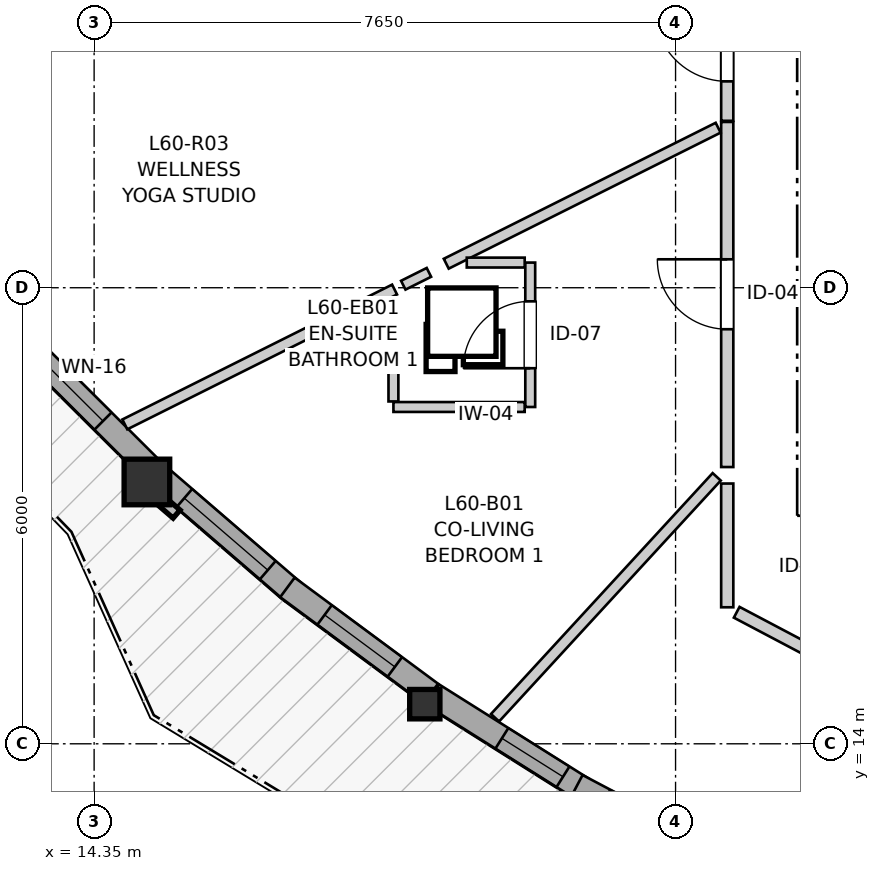
"""IFC4 building model, lengths in metres.
Left out: names, types, materials, properties, quantities, classifications, styles, units other than length and angle.
Written with IfcOpenShell. Run it as: python <this file> out.ifc"""

import sys

from ifc_helpers import new_model, si_unit, direction, frame, frame_2d, origin, origin_2d, place, context, subcontext, project, spatial, rectangle, i_section, extrude, source, transform, mapped, element, fill, save


model = new_model("IFC4")
c1 = context("Model", 3, precision=1e-05, world=origin(), true_north=direction((0.0, 1.0)))
c2 = subcontext(c1, "Body", "Model", "MODEL_VIEW")
j1 = project(units=[si_unit("LENGTHUNIT", "METRE"), si_unit("PLANEANGLEUNIT", "RADIAN")], contexts=[c1])
p1 = place(None, origin())
s1 = spatial("IfcSite", under=j1, at=p1, CompositionType="ELEMENT")
p2 = place(p1, origin())
s2 = spatial("IfcBuilding", under=s1, at=p2, CompositionType="ELEMENT")
p3 = place(p2, frame((0.0, 0.0, 202.0)))
s3 = spatial("IfcBuildingStorey", under=s2, at=p3, CompositionType="ELEMENT", Elevation=202.0)
m1 = source(origin(), c2, "Body", "SweptSolid", [
    extrude(rectangle(XDim=0.6, YDim=0.6, at=origin_2d()), origin(), (0.0, 0.0, 1.0), 2.935),
])
p4 = place(p3, frame((15.044, 17.445, 0.0), z_axis=(0.0, 0.0, 1.0), x_axis=(1.0, 0.0, 0.0)))
e1 = element("IfcColumn", 1, at=p4, inside=s3, PredefinedType="COLUMN", context=c2, shape_type="MappedRepresentation", body=[
    mapped(m1, transform((0.0, 0.0, 0.0), x_axis=(1.0, 0.0, 0.0), y_axis=(0.0, 1.0, 0.0), z_axis=(0.0, 0.0, 1.0), scale=1.0)),
])
m2 = source(origin(), c2, "Body", "SweptSolid", [
    extrude(i_section(OverallWidth=0.398, OverallDepth=0.387, WebThickness=0.019, FlangeThickness=0.03, FilletRadius=0.015, at=origin_2d()), origin(), (0.0, 0.0, 1.0), 2.935),
])
p5 = place(p3, frame((18.701, 14.521, 0.0), z_axis=(0.0, 0.0, 1.0), x_axis=(1.0, 0.0, 0.0)))
e2 = element("IfcColumn", 2, at=p5, inside=s3, PredefinedType="PILASTER", context=c2, shape_type="MappedRepresentation", body=[
    mapped(m2, transform((0.0, 0.0, 0.0), x_axis=(1.0, 0.0, 0.0), y_axis=(0.0, 1.0, 0.0), z_axis=(0.0, 0.0, 1.0), scale=1.0)),
])
p6 = place(p3, frame((13.434, 19.275, 0.0), z_axis=(0.0, 0.0, 1.0), x_axis=(0.708408377073, -0.705802784985, 0.0)))
e3 = element("IfcWall", 3, at=p6, inside=s3, PredefinedType="SOLIDWALL", context=c2, shape_type="SweptSolid", body=[
    extrude(rectangle(XDim=2.343, YDim=0.32, at=frame_2d((1.171, 0.0))), origin(), (0.0, 0.0, 1.0), 2.555),
])
p7 = place(p6, frame((0.308, 0.0, 0.82)))
e4 = element("IfcOpeningElement", 4, at=p7, cuts=e3, PredefinedType="OPENING", context=c2, shape_type="SweptSolid", body=[
    extrude(rectangle(XDim=1.15, YDim=1.2, at=frame_2d((0.575, 0.6))), frame((0.0, 0.17, 0.0), z_axis=(0.0, -1.0, 0.0), x_axis=(1.0, 0.0, 0.0)), (0.0, 0.0, 1.0), 0.34),
])
p8 = place(p3, frame((15.217, 17.507, 0.0), z_axis=(0.0, 0.0, 1.0), x_axis=(0.757473216355, -0.652866239366, 0.0)))
e5 = element("IfcWall", 5, at=p8, inside=s3, PredefinedType="SOLIDWALL", context=c2, shape_type="SweptSolid", body=[
    extrude(rectangle(XDim=2.303, YDim=0.32, at=frame_2d((1.152, 0.0))), origin(), (0.0, 0.0, 1.0), 2.555),
])
p9 = place(p8, frame((0.422, 0.0, 0.82)))
e6 = element("IfcOpeningElement", 6, at=p9, cuts=e5, PredefinedType="OPENING", context=c2, shape_type="SweptSolid", body=[
    extrude(rectangle(XDim=1.45, YDim=1.25, at=frame_2d((0.725, 0.625))), frame((0.0, 0.17, 0.0), z_axis=(0.0, -1.0, 0.0), x_axis=(1.0, 0.0, 0.0)), (0.0, 0.0, 1.0), 0.34),
])
p10 = place(p3, frame((16.893, 16.058, 0.0), z_axis=(0.0, 0.0, 1.0), x_axis=(0.803791161534, -0.594911563713, 0.0)))
e7 = element("IfcWall", 7, at=p10, inside=s3, PredefinedType="SOLIDWALL", context=c2, shape_type="SweptSolid", body=[
    extrude(rectangle(XDim=2.347, YDim=0.32, at=frame_2d((1.173, 0.0))), origin(), (0.0, 0.0, 1.0), 2.555),
])
p11 = place(p10, frame((0.608, 0.0, 0.82)))
e8 = element("IfcOpeningElement", 8, at=p11, cuts=e7, PredefinedType="OPENING", context=c2, shape_type="SweptSolid", body=[
    extrude(rectangle(XDim=1.15, YDim=1.2, at=frame_2d((0.575, 0.6))), frame((0.0, 0.17, 0.0), z_axis=(0.0, -1.0, 0.0), x_axis=(1.0, 0.0, 0.0)), (0.0, 0.0, 1.0), 0.34),
])
p12 = place(p3, frame((18.803, 14.646, 0.0), z_axis=(0.0, 0.0, 1.0), x_axis=(0.846390024768, -0.532563541724, 0.0)))
e9 = element("IfcWall", 9, at=p12, inside=s3, PredefinedType="SOLIDWALL", context=c2, shape_type="SweptSolid", body=[
    extrude(rectangle(XDim=2.334, YDim=0.32, at=frame_2d((1.167, 0.0))), origin(), (0.0, 0.0, 1.0), 2.555),
])
p13 = place(p12, frame((1.078, 0.0, 0.82)))
e10 = element("IfcOpeningElement", 10, at=p13, cuts=e9, PredefinedType="OPENING", context=c2, shape_type="SweptSolid", body=[
    extrude(rectangle(XDim=0.95, YDim=1.35, at=frame_2d((0.475, 0.675))), frame((0.0, 0.17, 0.0), z_axis=(0.0, -1.0, 0.0), x_axis=(1.0, 0.0, 0.0)), (0.0, 0.0, 1.0), 0.34),
])
p14 = place(p3, frame((20.702, 13.448, 0.0), z_axis=(0.0, 0.0, 1.0), x_axis=(0.884374859293, -0.466777364758, 0.0)))
e11 = element("IfcWall", 11, at=p14, inside=s3, PredefinedType="SOLIDWALL", context=c2, shape_type="SweptSolid", body=[
    extrude(rectangle(XDim=2.264, YDim=0.32, at=frame_2d((1.132, 0.0))), origin(), (0.0, 0.0, 1.0), 2.555),
])
p15 = place(p14, frame((0.412, 0.0, 0.82)))
e12 = element("IfcOpeningElement", 12, at=p15, cuts=e11, PredefinedType="OPENING", context=c2, shape_type="SweptSolid", body=[
    extrude(rectangle(XDim=1.45, YDim=1.25, at=frame_2d((0.725, 0.625))), frame((0.0, 0.17, 0.0), z_axis=(0.0, -1.0, 0.0), x_axis=(1.0, 0.0, 0.0)), (0.0, 0.0, 1.0), 0.34),
])
p16 = place(p3, frame((22.68, 17.641, 0.0), z_axis=(0.0, 0.0, 1.0), x_axis=(0.0, 1.0, 0.0)))
e13 = element("IfcWall", 13, at=p16, inside=s3, PredefinedType="PARTITIONING", context=c2, shape_type="SweptSolid", body=[
    extrude(rectangle(XDim=4.54, YDim=0.16, at=frame_2d((2.27, 0.0))), origin(), (0.0, 0.0, 1.0), 2.935),
])
p17 = place(p16, frame((1.813, 0.0, 0.0)))
e14 = element("IfcOpeningElement", 14, at=p17, cuts=e13, PredefinedType="OPENING", context=c2, shape_type="SweptSolid", body=[
    extrude(rectangle(XDim=0.92, YDim=2.1, at=frame_2d((0.46, 1.05))), frame((0.0, 0.09, 0.0), z_axis=(0.0, -1.0, 0.0), x_axis=(1.0, 0.0, 0.0)), (0.0, 0.0, 1.0), 0.18),
])
p18 = place(p3, frame((22.68, 22.196, 0.0), z_axis=(0.0, 0.0, 1.0), x_axis=(0.0, 1.0, 0.0)))
e15 = element("IfcWall", 15, at=p18, inside=s3, PredefinedType="PARTITIONING", context=c2, shape_type="SweptSolid", body=[
    extrude(rectangle(XDim=1.954, YDim=0.16, at=frame_2d((0.977, 0.0))), origin(), (0.0, 0.0, 1.0), 2.935),
])
p19 = place(p18, frame((0.519, 0.0, 0.0)))
e16 = element("IfcOpeningElement", 16, at=p19, cuts=e15, PredefinedType="OPENING", context=c2, shape_type="SweptSolid", body=[
    extrude(rectangle(XDim=0.96, YDim=2.1, at=frame_2d((0.48, 1.05))), frame((0.0, 0.09, 0.0), z_axis=(0.0, -1.0, 0.0), x_axis=(1.0, 0.0, 0.0)), (0.0, 0.0, 1.0), 0.18),
])
p20 = place(p3, frame((20.088, 18.431, 0.0), z_axis=(0.0, 0.0, 1.0), x_axis=(0.0, 1.0, 0.0)))
e17 = element("IfcWall", 17, at=p20, inside=s3, PredefinedType="PARTITIONING", context=c2, shape_type="SweptSolid", body=[
    extrude(rectangle(XDim=1.9, YDim=0.13, at=frame_2d((0.95, 0.0))), origin(), (0.0, 0.0, 1.0), 2.935),
])
p21 = place(p20, frame((0.51, 0.0, 0.0)))
e18 = element("IfcOpeningElement", 18, at=p21, cuts=e17, PredefinedType="OPENING", context=c2, shape_type="SweptSolid", body=[
    extrude(rectangle(XDim=0.88, YDim=2.05, at=frame_2d((0.44, 1.025))), frame((0.0, 0.075, 0.0), z_axis=(0.0, -1.0, 0.0), x_axis=(1.0, 0.0, 0.0)), (0.0, 0.0, 1.0), 0.15),
])
p22 = place(p3, frame((19.625, 14.343, 0.0), z_axis=(0.0, 0.0, 1.0), x_axis=(0.677104421975, 0.735886949023, 0.0)))
e19 = element("IfcWall", 19, at=p22, inside=s3, PredefinedType="PARTITIONING", context=c2, shape_type="SweptSolid", body=[
    extrude(rectangle(XDim=4.307, YDim=0.145, at=frame_2d((2.153, 0.0))), origin(), (0.0, 0.0, 1.0), 2.935),
])
p23 = place(p3, frame((18.983, 20.316, 0.0), z_axis=(0.0, 0.0, 1.0), x_axis=(0.894366146285, 0.447335664104, 0.0)))
e20 = element("IfcWall", 20, at=p23, inside=s3, PredefinedType="PARTITIONING", context=c2, shape_type="SweptSolid", body=[
    extrude(rectangle(XDim=4.0, YDim=0.145, at=frame_2d((2.0, 0.0))), origin(), (0.0, 0.0, 1.0), 2.935),
])
p24 = place(p3, frame((14.754, 18.202, 0.0), z_axis=(0.0, 0.0, 1.0), x_axis=(0.894464106055, 0.44713975777, 0.0)))
e21 = element("IfcWall", 21, at=p24, inside=s3, PredefinedType="PARTITIONING", context=c2, shape_type="SweptSolid", body=[
    extrude(rectangle(XDim=3.968, YDim=0.145, at=frame_2d((1.984, 0.0))), origin(), (0.0, 0.0, 1.0), 2.935),
])
p25 = place(p3, frame((22.68, 15.796, 0.0), z_axis=(0.0, 0.0, 1.0), x_axis=(0.0, 1.0, 0.0)))
e22 = element("IfcWall", 22, at=p25, inside=s3, PredefinedType="PARTITIONING", context=c2, shape_type="SweptSolid", body=[
    extrude(rectangle(XDim=1.628, YDim=0.16, at=frame_2d((0.814, 0.0))), origin(), (0.0, 0.0, 1.0), 2.935),
])
p26 = place(p3, frame((18.288, 18.431, 0.0), z_axis=(0.0, 0.0, 1.0), x_axis=(1.0, 0.0, 0.0)))
e23 = element("IfcWall", 23, at=p26, inside=s3, PredefinedType="PARTITIONING", context=c2, shape_type="SweptSolid", body=[
    extrude(rectangle(XDim=1.727, YDim=0.13, at=frame_2d((0.863, 0.0))), origin(), (0.0, 0.0, 1.0), 2.935),
])
p27 = place(p3, frame((22.804, 15.73, 0.0), z_axis=(0.0, 0.0, 1.0), x_axis=(0.884376976103, -0.466773354143, 0.0)))
e24 = element("IfcWall", 24, at=p27, inside=s3, PredefinedType="PARTITIONING", context=c2, shape_type="SweptSolid", body=[
    extrude(rectangle(XDim=1.44, YDim=0.16, at=frame_2d((0.72, 0.0))), origin(), (0.0, 0.0, 1.0), 2.935),
])
p28 = place(p3, frame((18.288, 18.504, 0.0), z_axis=(0.0, 0.0, 1.0), x_axis=(0.0, 1.0, 0.0)))
e25 = element("IfcWall", 25, at=p28, inside=s3, PredefinedType="PARTITIONING", context=c2, shape_type="SweptSolid", body=[
    extrude(rectangle(XDim=1.344, YDim=0.13, at=frame_2d((0.672, 0.0))), origin(), (0.0, 0.0, 1.0), 2.935),
])
p29 = place(p3, frame((19.253, 20.331, 0.0), z_axis=(0.0, 0.0, 1.0), x_axis=(1.0, 0.0, 0.0)))
e26 = element("IfcWall", 26, at=p29, inside=s3, PredefinedType="PARTITIONING", context=c2, shape_type="SweptSolid", body=[
    extrude(rectangle(XDim=0.762, YDim=0.13, at=frame_2d((0.381, 0.0))), origin(), (0.0, 0.0, 1.0), 2.935),
])
p30 = place(p3, frame((18.417, 20.033, 0.0), z_axis=(0.0, 0.0, 1.0), x_axis=(0.894427191, 0.4472135955, 0.0)))
e27 = element("IfcWall", 27, at=p30, inside=s3, PredefinedType="PARTITIONING", context=c2, shape_type="SweptSolid", body=[
    extrude(rectangle(XDim=0.377, YDim=0.13, at=frame_2d((0.188, 0.0))), origin(), (0.0, 0.0, 1.0), 2.935),
])
m3 = source(origin(), c2, "Body", "SweptSolid", [
    extrude(rectangle(XDim=1.15, YDim=1.2, at=frame_2d((0.575, 0.6))), frame((0.0, 0.03, 0.0), z_axis=(0.0, -1.0, 0.0), x_axis=(1.0, 0.0, 0.0)), (0.0, 0.0, 1.0), 0.06),
])
p31 = place(p7, origin())
e28 = element("IfcWindow", 28, at=p31, inside=s3, PartitioningType="SINGLE_PANEL", PredefinedType="WINDOW", context=c2, shape_type="MappedRepresentation", body=[
    mapped(m3, transform((0.0, 0.0, 0.0), x_axis=(1.0, 0.0, 0.0), y_axis=(0.0, 1.0, 0.0), z_axis=(0.0, 0.0, 1.0), scale=1.0)),
])
fill(e4, e28)
m4 = source(origin(), c2, "Body", "SweptSolid", [
    extrude(rectangle(XDim=1.45, YDim=1.25, at=frame_2d((0.725, 0.625))), frame((0.0, 0.03, 0.0), z_axis=(0.0, -1.0, 0.0), x_axis=(1.0, 0.0, 0.0)), (0.0, 0.0, 1.0), 0.06),
])
p32 = place(p9, origin())
e29 = element("IfcWindow", 29, at=p32, inside=s3, PartitioningType="SINGLE_PANEL", PredefinedType="WINDOW", context=c2, shape_type="MappedRepresentation", body=[
    mapped(m4, transform((0.0, 0.0, 0.0), x_axis=(1.0, 0.0, 0.0), y_axis=(0.0, 1.0, 0.0), z_axis=(0.0, 0.0, 1.0), scale=1.0)),
])
fill(e6, e29)
p33 = place(p11, origin())
e30 = element("IfcWindow", 30, at=p33, inside=s3, PartitioningType="SINGLE_PANEL", PredefinedType="WINDOW", context=c2, shape_type="MappedRepresentation", body=[
    mapped(m3, transform((0.0, 0.0, 0.0), x_axis=(1.0, 0.0, 0.0), y_axis=(0.0, 1.0, 0.0), z_axis=(0.0, 0.0, 1.0), scale=1.0)),
])
fill(e8, e30)
m5 = source(origin(), c2, "Body", "SweptSolid", [
    extrude(rectangle(XDim=0.95, YDim=1.35, at=frame_2d((0.475, 0.675))), frame((0.0, 0.03, 0.0), z_axis=(0.0, -1.0, 0.0), x_axis=(1.0, 0.0, 0.0)), (0.0, 0.0, 1.0), 0.06),
])
p34 = place(p13, origin())
e31 = element("IfcWindow", 31, at=p34, inside=s3, PartitioningType="SINGLE_PANEL", PredefinedType="WINDOW", context=c2, shape_type="MappedRepresentation", body=[
    mapped(m5, transform((0.0, 0.0, 0.0), x_axis=(1.0, 0.0, 0.0), y_axis=(0.0, 1.0, 0.0), z_axis=(0.0, 0.0, 1.0), scale=1.0)),
])
fill(e10, e31)
m6 = source(origin(), c2, "Body", "SweptSolid", [
    extrude(rectangle(XDim=0.92, YDim=2.1, at=frame_2d((0.46, 1.05))), frame((0.0, 0.025, 0.0), z_axis=(0.0, -1.0, 0.0), x_axis=(1.0, 0.0, 0.0)), (0.0, 0.0, 1.0), 0.05),
])
p35 = place(p17, origin())
e32 = element("IfcDoor", 32, at=p35, inside=s3, OperationType="SINGLE_SWING_RIGHT", PredefinedType="DOOR", context=c2, shape_type="MappedRepresentation", body=[
    mapped(m6, transform((0.0, 0.0, 0.0), x_axis=(1.0, 0.0, 0.0), y_axis=(0.0, 1.0, 0.0), z_axis=(0.0, 0.0, 1.0), scale=1.0)),
])
fill(e14, e32)
m7 = source(origin(), c2, "Body", "SweptSolid", [
    extrude(rectangle(XDim=0.96, YDim=2.1, at=frame_2d((0.48, 1.05))), frame((0.0, 0.025, 0.0), z_axis=(0.0, -1.0, 0.0), x_axis=(1.0, 0.0, 0.0)), (0.0, 0.0, 1.0), 0.05),
])
p36 = place(p19, origin())
e33 = element("IfcDoor", 33, at=p36, inside=s3, OperationType="SINGLE_SWING_RIGHT", PredefinedType="DOOR", context=c2, shape_type="MappedRepresentation", body=[
    mapped(m7, transform((0.0, 0.0, 0.0), x_axis=(1.0, 0.0, 0.0), y_axis=(0.0, 1.0, 0.0), z_axis=(0.0, 0.0, 1.0), scale=1.0)),
])
fill(e16, e33)
m8 = source(origin(), c2, "Body", "SweptSolid", [
    extrude(rectangle(XDim=0.88, YDim=2.05, at=frame_2d((0.44, 1.025))), frame((0.0, 0.025, 0.0), z_axis=(0.0, -1.0, 0.0), x_axis=(1.0, 0.0, 0.0)), (0.0, 0.0, 1.0), 0.05),
])
p37 = place(p21, origin())
e34 = element("IfcDoor", 34, at=p37, inside=s3, OperationType="SINGLE_SWING_LEFT", PredefinedType="DOOR", context=c2, shape_type="MappedRepresentation", body=[
    mapped(m8, transform((0.0, 0.0, 0.0), x_axis=(1.0, 0.0, 0.0), y_axis=(0.0, 1.0, 0.0), z_axis=(0.0, 0.0, 1.0), scale=1.0)),
])
fill(e18, e34)
save(model, sys.argv[1])
